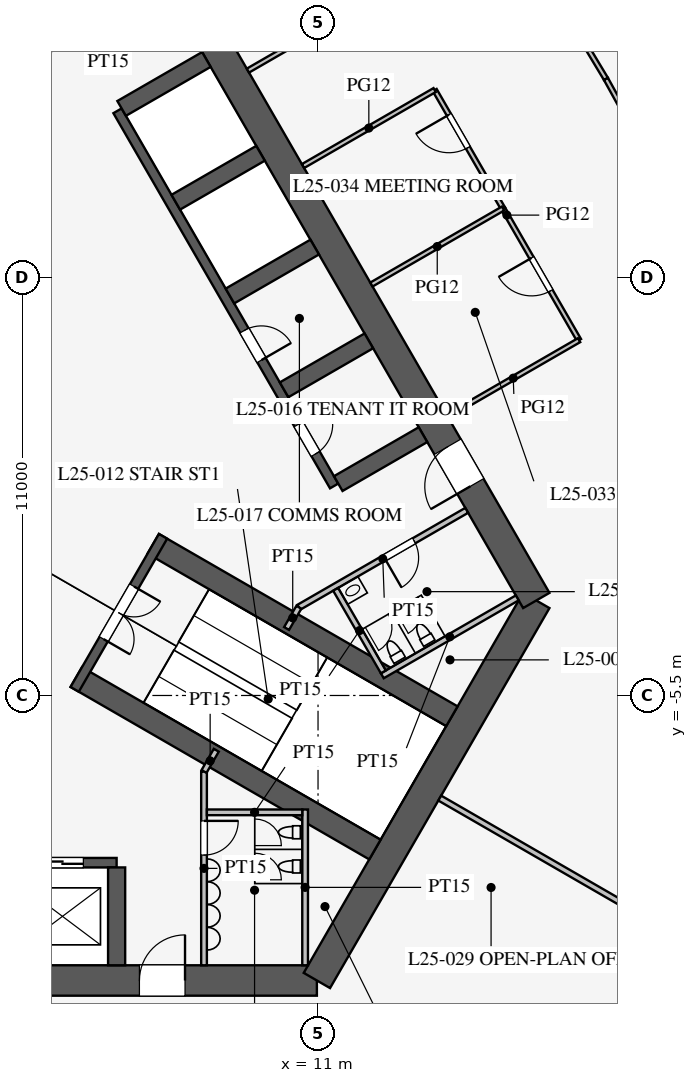
"""IFC4 building model, lengths in metres.
Left out: names, types, materials, properties, quantities, classifications, styles, units other than length and angle.
Written with IfcOpenShell. Run it as: python <this file> out.ifc"""

import sys

from ifc_helpers import new_model, si_unit, direction, frame, frame_2d, origin, place, context, subcontext, project, spatial, rectangle, extrude, element, fill, save


model = new_model("IFC4")
c1 = context("Model", 3, precision=1e-05, world=origin(), true_north=direction((0.0, 1.0)))
c2 = subcontext(c1, "Body", "Model", "MODEL_VIEW")
j1 = project(units=[si_unit("LENGTHUNIT", "METRE"), si_unit("PLANEANGLEUNIT", "RADIAN")], contexts=[c1])
p1 = place(None, origin())
s1 = spatial("IfcSite", under=j1, at=p1, CompositionType="ELEMENT")
p2 = place(p1, origin())
s2 = spatial("IfcBuilding", under=s1, at=p2, CompositionType="ELEMENT")
p3 = place(p2, frame((0.0, 0.0, 111.5)))
s3 = spatial("IfcBuildingStorey", under=s2, at=p3, CompositionType="ELEMENT", Elevation=111.5)
p4 = place(p3, frame((-10.97, -13.0, 0.0), z_axis=(0.0, 0.0, 1.0), x_axis=(1.0, 0.0, 0.0)))
e1 = element("IfcWall", 1, at=p4, inside=s3, PredefinedType="SHEAR", context=c2, shape_type="SweptSolid", body=[
    extrude(rectangle(XDim=21.939, YDim=0.8, at=frame_2d((10.97, 0.0))), origin(), (0.0, 0.0, 1.0), 4.2),
])
p5 = place(p4, frame((17.27, 0.0, 0.0)))
e2 = element("IfcOpeningElement", 2, at=p5, cuts=e1, PredefinedType="OPENING", context=c2, shape_type="SweptSolid", body=[
    extrude(rectangle(XDim=1.2, YDim=2.1, at=frame_2d((0.6, 1.05))), frame((0.0, 0.41, 0.0), z_axis=(0.0, -1.0, 0.0), x_axis=(1.0, 0.0, 0.0)), (0.0, 0.0, 1.0), 0.82),
])
p6 = place(p4, frame((3.47, 0.0, 0.0)))
e3 = element("IfcOpeningElement", 3, at=p6, cuts=e1, PredefinedType="OPENING", context=c2, shape_type="SweptSolid", body=[
    extrude(rectangle(XDim=1.2, YDim=2.1, at=frame_2d((0.6, 1.05))), frame((0.0, 0.41, 0.0), z_axis=(0.0, -1.0, 0.0), x_axis=(1.0, 0.0, 0.0)), (0.0, 0.0, 1.0), 0.82),
])
p7 = place(p3, frame((10.97, -13.0, 0.0), z_axis=(0.0, 0.0, 1.0), x_axis=(0.499995765644, 0.866027848477, 0.0)))
e4 = element("IfcWall", 4, at=p7, inside=s3, PredefinedType="SHEAR", context=c2, shape_type="SweptSolid", body=[
    extrude(rectangle(XDim=11.547, YDim=0.8, at=frame_2d((5.773, 0.0))), origin(), (0.0, 0.0, 1.0), 4.2),
])
p8 = place(p3, frame((16.743, -3.0, 0.0), z_axis=(0.0, 0.0, 1.0), x_axis=(-0.500002442456, 0.866023993627, 0.0)))
e5 = element("IfcWall", 5, at=p8, inside=s3, PredefinedType="SHEAR", context=c2, shape_type="SweptSolid", body=[
    extrude(rectangle(XDim=21.939, YDim=0.8, at=frame_2d((10.97, 0.0))), origin(), (0.0, 0.0, 1.0), 4.2),
])
p9 = place(p8, frame((17.27, 0.0, 0.0)))
e6 = element("IfcOpeningElement", 6, at=p9, cuts=e5, PredefinedType="OPENING", context=c2, shape_type="SweptSolid", body=[
    extrude(rectangle(XDim=1.2, YDim=2.1, at=frame_2d((0.6, 1.05))), frame((0.0, 0.41, 0.0), z_axis=(0.0, -1.0, 0.0), x_axis=(1.0, 0.0, 0.0)), (0.0, 0.0, 1.0), 0.82),
])
p10 = place(p8, frame((3.47, 0.0, 0.0)))
e7 = element("IfcOpeningElement", 7, at=p10, cuts=e5, PredefinedType="OPENING", context=c2, shape_type="SweptSolid", body=[
    extrude(rectangle(XDim=1.2, YDim=2.1, at=frame_2d((0.6, 1.05))), frame((0.0, 0.41, 0.0), z_axis=(0.0, -1.0, 0.0), x_axis=(1.0, 0.0, 0.0)), (0.0, 0.0, 1.0), 0.82),
])
p11 = place(p3, frame((-5.7, -9.9, 0.0), z_axis=(0.0, 0.0, 1.0), x_axis=(1.0, 0.0, 0.0)))
e8 = element("IfcWall", 8, at=p11, inside=s3, PredefinedType="SHEAR", context=c2, shape_type="SweptSolid", body=[
    extrude(rectangle(XDim=11.4, YDim=0.25, at=frame_2d((5.7, 0.0))), origin(), (0.0, 0.0, 1.0), 4.2),
])
p12 = place(p11, frame((0.875, 0.0, 0.0)))
e9 = element("IfcOpeningElement", 9, at=p12, cuts=e8, PredefinedType="OPENING", context=c2, shape_type="SweptSolid", body=[
    extrude(rectangle(XDim=1.1, YDim=2.2, at=frame_2d((0.55, 1.1))), frame((0.0, 0.135, 0.0), z_axis=(0.0, -1.0, 0.0), x_axis=(1.0, 0.0, 0.0)), (0.0, 0.0, 1.0), 0.27),
])
p13 = place(p11, frame((3.725, 0.0, 0.0)))
e10 = element("IfcOpeningElement", 10, at=p13, cuts=e8, PredefinedType="OPENING", context=c2, shape_type="SweptSolid", body=[
    extrude(rectangle(XDim=1.1, YDim=2.2, at=frame_2d((0.55, 1.1))), frame((0.0, 0.135, 0.0), z_axis=(0.0, -1.0, 0.0), x_axis=(1.0, 0.0, 0.0)), (0.0, 0.0, 1.0), 0.27),
])
p14 = place(p11, frame((6.575, 0.0, 0.0)))
e11 = element("IfcOpeningElement", 11, at=p14, cuts=e8, PredefinedType="OPENING", context=c2, shape_type="SweptSolid", body=[
    extrude(rectangle(XDim=1.1, YDim=2.2, at=frame_2d((0.55, 1.1))), frame((0.0, 0.135, 0.0), z_axis=(0.0, -1.0, 0.0), x_axis=(1.0, 0.0, 0.0)), (0.0, 0.0, 1.0), 0.27),
])
p15 = place(p11, frame((9.425, 0.0, 0.0)))
e12 = element("IfcOpeningElement", 12, at=p15, cuts=e8, PredefinedType="OPENING", context=c2, shape_type="SweptSolid", body=[
    extrude(rectangle(XDim=1.1, YDim=2.2, at=frame_2d((0.55, 1.1))), frame((0.0, 0.135, 0.0), z_axis=(0.0, -1.0, 0.0), x_axis=(1.0, 0.0, 0.0)), (0.0, 0.0, 1.0), 0.27),
])
p16 = place(p3, frame((5.7, -10.025, 0.0), z_axis=(0.0, 0.0, 1.0), x_axis=(0.0, -1.0, 0.0)))
e13 = element("IfcWall", 13, at=p16, inside=s3, PredefinedType="SHEAR", context=c2, shape_type="SweptSolid", body=[
    extrude(rectangle(XDim=2.575, YDim=0.45, at=frame_2d((1.288, 0.0))), origin(), (0.0, 0.0, 1.0), 4.2),
])
p17 = place(p3, frame((11.424, 0.014, 0.0), z_axis=(0.0, 0.0, 1.0), x_axis=(-0.500001763848, 0.866024385424, 0.0)))
e14 = element("IfcWall", 14, at=p17, inside=s3, PredefinedType="SHEAR", context=c2, shape_type="SweptSolid", body=[
    extrude(rectangle(XDim=11.4, YDim=0.25, at=frame_2d((5.7, 0.0))), origin(), (0.0, 0.0, 1.0), 4.2),
])
p18 = place(p17, frame((0.975, 0.0, 0.0)))
e15 = element("IfcOpeningElement", 15, at=p18, cuts=e14, PredefinedType="OPENING", context=c2, shape_type="SweptSolid", body=[
    extrude(rectangle(XDim=0.9, YDim=2.1, at=frame_2d((0.45, 1.05))), frame((0.0, 0.135, 0.0), z_axis=(0.0, -1.0, 0.0), x_axis=(1.0, 0.0, 0.0)), (0.0, 0.0, 1.0), 0.27),
])
p19 = place(p17, frame((3.825, 0.0, 0.0)))
e16 = element("IfcOpeningElement", 16, at=p19, cuts=e14, PredefinedType="OPENING", context=c2, shape_type="SweptSolid", body=[
    extrude(rectangle(XDim=0.9, YDim=2.1, at=frame_2d((0.45, 1.05))), frame((0.0, 0.135, 0.0), z_axis=(0.0, -1.0, 0.0), x_axis=(1.0, 0.0, 0.0)), (0.0, 0.0, 1.0), 0.27),
])
for number, where, z_axis, x_axis in (
    (17, (11.532, 0.076, 0.0), (0.0, 0.0, 1.0), (0.866, 0.5, 0.0)),
    (18, (10.107, 2.544, 0.0), (0.0, 0.0, 1.0), (0.866, 0.5, 0.0)),
    (19, (8.682, 5.012, 0.0), (0.0, 0.0, 1.0), (0.866, 0.5, 0.0)),
    (20, (7.257, 7.481, 0.0), (0.0, 0.0, 1.0), (0.866, 0.5, 0.0)),
):
    element("IfcWall", number, at=place(p3, frame(where, z_axis=z_axis, x_axis=x_axis)), inside=s3, PredefinedType="SHEAR", context=c2, shape_type="SweptSolid", body=[
        extrude(rectangle(XDim=2.575, YDim=0.45, at=frame_2d((1.288, 0.0))), origin(), (0.0, 0.0, 1.0), 4.2),
    ])
p20 = place(p3, frame((5.832, 9.949, 0.0), z_axis=(0.0, 0.0, 1.0), x_axis=(0.866029291668, 0.499993265928, 0.0)))
e21 = element("IfcWall", 21, at=p20, inside=s3, PredefinedType="SHEAR", context=c2, shape_type="SweptSolid", body=[
    extrude(rectangle(XDim=2.575, YDim=0.45, at=frame_2d((1.288, 0.0))), origin(), (0.0, 0.0, 1.0), 4.2),
])
for number, where, z_axis, x_axis in (
    (22, (4.638, -5.016, 0.0), (0.0, 0.0, 1.0), (0.866, -0.5, 0.0)),
    (23, (6.663, -1.509, 0.0), (0.0, 0.0, 1.0), (0.866, -0.5, 0.0)),
):
    element("IfcWall", number, at=place(p3, frame(where, z_axis=z_axis, x_axis=x_axis)), inside=s3, PredefinedType="SHEAR", context=c2, shape_type="SweptSolid", body=[
        extrude(rectangle(XDim=9.075, YDim=0.6, at=frame_2d((4.538, 0.0))), origin(), (0.0, 0.0, 1.0), 4.2),
    ])
p21 = place(p3, frame((4.597, -5.339, 0.0), z_axis=(0.0, 0.0, 1.0), x_axis=(0.499984536904, 0.866034331223, 0.0)))
e24 = element("IfcWall", 24, at=p21, inside=s3, PredefinedType="SHEAR", context=c2, shape_type="SweptSolid", body=[
    extrude(rectangle(XDim=4.65, YDim=0.25, at=frame_2d((2.325, 0.0))), origin(), (0.0, 0.0, 1.0), 4.2),
])
p22 = place(p21, frame((1.525, 0.0, 0.0)))
e25 = element("IfcOpeningElement", 25, at=p22, cuts=e24, PredefinedType="OPENING", context=c2, shape_type="SweptSolid", body=[
    extrude(rectangle(XDim=1.6, YDim=2.1, at=frame_2d((0.8, 1.05))), frame((0.0, 0.135, 0.0), z_axis=(0.0, -1.0, 0.0), x_axis=(1.0, 0.0, 0.0)), (0.0, 0.0, 1.0), 0.27),
])
p23 = place(p3, frame((8.0, -7.5, 0.0), z_axis=(0.0, 0.0, 1.0), x_axis=(0.0, -1.0, 0.0)))
e26 = element("IfcWall", 26, at=p23, inside=s3, PredefinedType="PARTITIONING", context=c2, shape_type="SweptSolid", body=[
    extrude(rectangle(XDim=5.1, YDim=0.15, at=frame_2d((2.55, 0.0))), origin(), (0.0, 0.0, 1.0), 4.0),
])
p24 = place(p23, frame((1.3, 0.0, 0.0)))
e27 = element("IfcOpeningElement", 27, at=p24, cuts=e26, PredefinedType="OPENING", context=c2, shape_type="SweptSolid", body=[
    extrude(rectangle(XDim=0.9, YDim=2.1, at=frame_2d((0.45, 1.05))), frame((0.0, 0.085, 0.0), z_axis=(0.0, -1.0, 0.0), x_axis=(1.0, 0.0, 0.0)), (0.0, 0.0, 1.0), 0.17),
])
p25 = place(p3, frame((2.495, 10.678, 0.0), z_axis=(0.0, 0.0, 1.0), x_axis=(0.86602216432, 0.500005610874, 0.0)))
e28 = element("IfcWall", 28, at=p25, inside=s3, PredefinedType="PARTITIONING", context=c2, shape_type="SweptSolid", body=[
    extrude(rectangle(XDim=5.1, YDim=0.15, at=frame_2d((2.55, 0.0))), origin(), (0.0, 0.0, 1.0), 4.0),
])
p26 = place(p25, frame((2.6, 0.0, 0.0)))
e29 = element("IfcOpeningElement", 29, at=p26, cuts=e28, PredefinedType="OPENING", context=c2, shape_type="SweptSolid", body=[
    extrude(rectangle(XDim=0.9, YDim=2.1, at=frame_2d((0.45, 1.05))), frame((0.0, 0.085, 0.0), z_axis=(0.0, -1.0, 0.0), x_axis=(1.0, 0.0, 0.0)), (0.0, 0.0, 1.0), 0.17),
])
p27 = place(p3, frame((10.495, -3.178, 0.0), z_axis=(0.0, 0.0, 1.0), x_axis=(0.86602216432, 0.500005610874, 0.0)))
e30 = element("IfcWall", 30, at=p27, inside=s3, PredefinedType="PARTITIONING", context=c2, shape_type="SweptSolid", body=[
    extrude(rectangle(XDim=5.1, YDim=0.15, at=frame_2d((2.55, 0.0))), origin(), (0.0, 0.0, 1.0), 4.0),
])
p28 = place(p27, frame((2.6, 0.0, 0.0)))
e31 = element("IfcOpeningElement", 31, at=p28, cuts=e30, PredefinedType="OPENING", context=c2, shape_type="SweptSolid", body=[
    extrude(rectangle(XDim=0.9, YDim=2.1, at=frame_2d((0.45, 1.05))), frame((0.0, 0.085, 0.0), z_axis=(0.0, -1.0, 0.0), x_axis=(1.0, 0.0, 0.0)), (0.0, 0.0, 1.0), 0.17),
])
for number, where, z_axis, x_axis in (
    (32, (8.0, -7.5, 0.0), (0.0, 0.0, 1.0), (0.5, 0.866, 0.0)),
    (33, (10.495, -3.178, 0.0), (0.0, 0.0, 1.0), (-0.5, -0.866, 0.0)),
):
    element("IfcWall", number, at=place(p3, frame(where, z_axis=z_axis, x_axis=x_axis)), inside=s3, PredefinedType="PARTITIONING", context=c2, shape_type="SweptSolid", body=[
        extrude(rectangle(XDim=0.645, YDim=0.15, at=frame_2d((0.323, 0.0))), origin(), (0.0, 0.0, 1.0), 4.0),
    ])
p29 = place(p3, frame((10.66, -8.5, 0.0), z_axis=(0.0, 0.0, 1.0), x_axis=(0.0, -1.0, 0.0)))
e34 = element("IfcWall", 34, at=p29, inside=s3, PredefinedType="PARTITIONING", context=c2, shape_type="SweptSolid", body=[
    extrude(rectangle(XDim=4.1, YDim=0.15, at=frame_2d((2.05, 0.0))), origin(), (0.0, 0.0, 1.0), 4.0),
])
p30 = place(p3, frame((8.075, -8.575, 0.0), z_axis=(0.0, 0.0, 1.0), x_axis=(1.0, 0.0, 0.0)))
e35 = element("IfcWall", 35, at=p30, inside=s3, PredefinedType="PARTITIONING", context=c2, shape_type="SweptSolid", body=[
    extrude(rectangle(XDim=2.51, YDim=0.15, at=frame_2d((1.255, 0.0))), origin(), (0.0, 0.0, 1.0), 4.0),
])
p31 = place(p3, frame((12.691, -4.982, 0.0), z_axis=(0.0, 0.0, 1.0), x_axis=(0.8660249478, 0.500000789788, 0.0)))
e36 = element("IfcWall", 36, at=p31, inside=s3, PredefinedType="PARTITIONING", context=c2, shape_type="SweptSolid", body=[
    extrude(rectangle(XDim=4.1, YDim=0.15, at=frame_2d((2.05, 0.0))), origin(), (0.0, 0.0, 1.0), 4.0),
])
p32 = place(p3, frame((11.464, -2.706, 0.0), z_axis=(0.0, 0.0, 1.0), x_axis=(0.50001992892, -0.866013897511, 0.0)))
e37 = element("IfcWall", 37, at=p32, inside=s3, PredefinedType="PARTITIONING", context=c2, shape_type="SweptSolid", body=[
    extrude(rectangle(XDim=2.51, YDim=0.15, at=frame_2d((1.255, 0.0))), origin(), (0.0, 0.0, 1.0), 4.0),
])
p33 = place(p3, frame((14.203, -8.2, 0.0), z_axis=(0.0, 0.0, 1.0), x_axis=(0.866024668836, -0.500001272966, 0.0)))
e38 = element("IfcWall", 38, at=p33, inside=s3, PredefinedType="PARTITIONING", context=c2, shape_type="SweptSolid", body=[
    extrude(rectangle(XDim=16.65, YDim=0.15, at=frame_2d((8.325, 0.0))), origin(), (0.0, 0.0, 1.0), 2.3),
])
p34 = place(p3, frame((15.869, 7.314, 0.0), z_axis=(0.0, 0.0, 1.0), x_axis=(-0.500012057535, 0.866018442252, 0.0)))
e39 = element("IfcWall", 39, at=p34, inside=s3, PredefinedType="PARTITIONING", context=c2, shape_type="SweptSolid", body=[
    extrude(rectangle(XDim=3.6, YDim=0.12, at=frame_2d((1.8, 0.0))), origin(), (0.0, 0.0, 1.0), 2.9),
])
p35 = place(p34, frame((1.85, 0.0, 0.15)))
e40 = element("IfcOpeningElement", 40, at=p35, cuts=e39, PredefinedType="OPENING", context=c2, shape_type="SweptSolid", body=[
    extrude(rectangle(XDim=1.0, YDim=2.1, at=frame_2d((0.5, 1.05))), frame((0.0, 0.07, 0.0), z_axis=(0.0, -1.0, 0.0), x_axis=(1.0, 0.0, 0.0)), (0.0, 0.0, 1.0), 0.14),
])
p36 = place(p3, frame((17.869, 3.85, 0.0), z_axis=(0.0, 0.0, 1.0), x_axis=(-0.49999894854, 0.866026010844, 0.0)))
e41 = element("IfcWall", 41, at=p36, inside=s3, PredefinedType="PARTITIONING", context=c2, shape_type="SweptSolid", body=[
    extrude(rectangle(XDim=4.0, YDim=0.12, at=frame_2d((2.0, 0.0))), origin(), (0.0, 0.0, 1.0), 2.9),
])
p37 = place(p36, frame((1.5, 0.0, 0.15)))
e42 = element("IfcOpeningElement", 42, at=p37, cuts=e41, PredefinedType="OPENING", context=c2, shape_type="SweptSolid", body=[
    extrude(rectangle(XDim=1.0, YDim=2.1, at=frame_2d((0.5, 1.05))), frame((0.0, 0.07, 0.0), z_axis=(0.0, -1.0, 0.0), x_axis=(1.0, 0.0, 0.0)), (0.0, 0.0, 1.0), 0.14),
])
p38 = place(p3, frame((10.605, 8.432, 0.0), z_axis=(0.0, 0.0, 1.0), x_axis=(0.866026010844, 0.49999894854, 0.0)))
e43 = element("IfcWall", 43, at=p38, inside=s3, PredefinedType="PARTITIONING", context=c2, shape_type="SweptSolid", body=[
    extrude(rectangle(XDim=4.0, YDim=0.12, at=frame_2d((2.0, 0.0))), origin(), (0.0, 0.0, 1.0), 2.9),
])
p39 = place(p3, frame((9.155, 10.944, 0.0), z_axis=(0.0, 0.0, 1.0), x_axis=(0.866017533419, 0.500013631625, 0.0)))
e44 = element("IfcWall", 44, at=p39, inside=s3, PredefinedType="PARTITIONING", context=c2, shape_type="SweptSolid", body=[
    extrude(rectangle(XDim=4.5, YDim=0.12, at=frame_2d((2.25, 0.0))), origin(), (0.0, 0.0, 1.0), 2.9),
])
for number, where, z_axis, x_axis in (
    (45, (12.405, 5.314, 0.0), (0.0, 0.0, 1.0), (0.866, 0.5, 0.0)),
    (46, (14.405, 1.85, 0.0), (0.0, 0.0, 1.0), (0.866, 0.5, 0.0)),
):
    element("IfcWall", number, at=place(p3, frame(where, z_axis=z_axis, x_axis=x_axis)), inside=s3, PredefinedType="PARTITIONING", context=c2, shape_type="SweptSolid", body=[
        extrude(rectangle(XDim=4.0, YDim=0.12, at=frame_2d((2.0, 0.0))), origin(), (0.0, 0.0, 1.0), 2.9),
    ])
p40 = place(p3, frame((18.576, 10.725, 0.0), z_axis=(0.0, 0.0, 1.0), x_axis=(-0.515548366618, 0.856860479703, 0.0)))
e47 = element("IfcWall", 47, at=p40, inside=s3, PredefinedType="PARTITIONING", context=c2, shape_type="SweptSolid", body=[
    extrude(rectangle(XDim=4.501, YDim=0.12, at=frame_2d((2.25, 0.0))), origin(), (0.0, 0.0, 1.0), 2.9),
])
p41 = place(p40, frame((1.75, 0.0, 0.15)))
e48 = element("IfcOpeningElement", 48, at=p41, cuts=e47, PredefinedType="OPENING", context=c2, shape_type="SweptSolid", body=[
    extrude(rectangle(XDim=1.0, YDim=2.1, at=frame_2d((0.5, 1.05))), frame((0.0, 0.07, 0.0), z_axis=(0.0, -1.0, 0.0), x_axis=(1.0, 0.0, 0.0)), (0.0, 0.0, 1.0), 0.14),
])
p42 = place(p3, frame((20.756, 6.787, 0.0), z_axis=(0.0, 0.0, 1.0), x_axis=(-0.484292898211, 0.874905931368, 0.0)))
e49 = element("IfcWall", 49, at=p42, inside=s3, PredefinedType="PARTITIONING", context=c2, shape_type="SweptSolid", body=[
    extrude(rectangle(XDim=4.501, YDim=0.12, at=frame_2d((2.25, 0.0))), origin(), (0.0, 0.0, 1.0), 2.9),
])
p43 = place(p24, origin())
e50 = element("IfcDoor", 50, at=p43, inside=s3, OperationType="SINGLE_SWING_LEFT", PredefinedType="DOOR", context=c2, shape_type="SweptSolid", body=[
    extrude(rectangle(XDim=0.9, YDim=2.1, at=frame_2d((0.45, 1.05))), frame((0.0, 0.025, 0.0), z_axis=(0.0, -1.0, 0.0), x_axis=(1.0, 0.0, 0.0)), (0.0, 0.0, 1.0), 0.05),
])
fill(e27, e50)
p44 = place(p28, frame((0.9, 0.0, 0.0), z_axis=(0.0, 0.0, 1.0), x_axis=(-1.0, 0.0, 0.0)))
e51 = element("IfcDoor", 51, at=p44, inside=s3, OperationType="SINGLE_SWING_RIGHT", PredefinedType="DOOR", context=c2, shape_type="SweptSolid", body=[
    extrude(rectangle(XDim=0.9, YDim=2.1, at=frame_2d((0.45, 1.05))), frame((0.0, 0.025, 0.0), z_axis=(0.0, -1.0, 0.0), x_axis=(1.0, 0.0, 0.0)), (0.0, 0.0, 1.0), 0.05),
])
fill(e31, e51)
p45 = place(p22, frame((1.6, 0.0, 0.0), z_axis=(0.0, 0.0, 1.0), x_axis=(-1.0, 0.0, 0.0)))
e52 = element("IfcDoor", 52, at=p45, inside=s3, OperationType="DOUBLE_DOOR_SINGLE_SWING", PredefinedType="DOOR", context=c2, shape_type="SweptSolid", body=[
    extrude(rectangle(XDim=1.6, YDim=2.1, at=frame_2d((0.8, 1.05))), frame((0.0, 0.025, 0.0), z_axis=(0.0, -1.0, 0.0), x_axis=(1.0, 0.0, 0.0)), (0.0, 0.0, 1.0), 0.05),
])
fill(e25, e52)
p46 = place(p5, origin())
e53 = element("IfcDoor", 53, at=p46, inside=s3, OperationType="SINGLE_SWING_RIGHT", PredefinedType="DOOR", context=c2, shape_type="SweptSolid", body=[
    extrude(rectangle(XDim=1.2, YDim=2.1, at=frame_2d((0.6, 1.05))), frame((0.0, 0.025, 0.0), z_axis=(0.0, -1.0, 0.0), x_axis=(1.0, 0.0, 0.0)), (0.0, 0.0, 1.0), 0.05),
])
fill(e2, e53)
p47 = place(p10, origin())
e54 = element("IfcDoor", 54, at=p47, inside=s3, OperationType="SINGLE_SWING_LEFT", PredefinedType="DOOR", context=c2, shape_type="SweptSolid", body=[
    extrude(rectangle(XDim=1.2, YDim=2.1, at=frame_2d((0.6, 1.05))), frame((0.0, 0.025, 0.0), z_axis=(0.0, -1.0, 0.0), x_axis=(1.0, 0.0, 0.0)), (0.0, 0.0, 1.0), 0.05),
])
fill(e7, e54)
p48 = place(p18, frame((0.9, 0.0, 0.0), z_axis=(0.0, 0.0, 1.0), x_axis=(-1.0, 0.0, 0.0)))
e55 = element("IfcDoor", 55, at=p48, inside=s3, OperationType="SINGLE_SWING_LEFT", PredefinedType="DOOR", context=c2, shape_type="SweptSolid", body=[
    extrude(rectangle(XDim=0.9, YDim=2.1, at=frame_2d((0.45, 1.05))), frame((0.0, 0.025, 0.0), z_axis=(0.0, -1.0, 0.0), x_axis=(1.0, 0.0, 0.0)), (0.0, 0.0, 1.0), 0.05),
])
fill(e15, e55)
p49 = place(p19, frame((0.9, 0.0, 0.0), z_axis=(0.0, 0.0, 1.0), x_axis=(-1.0, 0.0, 0.0)))
e56 = element("IfcDoor", 56, at=p49, inside=s3, OperationType="SINGLE_SWING_RIGHT", PredefinedType="DOOR", context=c2, shape_type="SweptSolid", body=[
    extrude(rectangle(XDim=0.9, YDim=2.1, at=frame_2d((0.45, 1.05))), frame((0.0, 0.025, 0.0), z_axis=(0.0, -1.0, 0.0), x_axis=(1.0, 0.0, 0.0)), (0.0, 0.0, 1.0), 0.05),
])
fill(e16, e56)
p50 = place(p37, origin())
e57 = element("IfcDoor", 57, at=p50, inside=s3, OperationType="SINGLE_SWING_RIGHT", PredefinedType="DOOR", context=c2, shape_type="SweptSolid", body=[
    extrude(rectangle(XDim=1.0, YDim=2.1, at=frame_2d((0.5, 1.05))), frame((0.0, 0.025, 0.0), z_axis=(0.0, -1.0, 0.0), x_axis=(1.0, 0.0, 0.0)), (0.0, 0.0, 1.0), 0.05),
])
fill(e42, e57)
p51 = place(p35, origin())
e58 = element("IfcDoor", 58, at=p51, inside=s3, OperationType="SINGLE_SWING_RIGHT", PredefinedType="DOOR", context=c2, shape_type="SweptSolid", body=[
    extrude(rectangle(XDim=1.0, YDim=2.1, at=frame_2d((0.5, 1.05))), frame((0.0, 0.025, 0.0), z_axis=(0.0, -1.0, 0.0), x_axis=(1.0, 0.0, 0.0)), (0.0, 0.0, 1.0), 0.05),
])
fill(e40, e58)
p52 = place(p15, origin())
e59 = element("IfcDoor", 59, at=p52, inside=s3, OperationType="DOUBLE_DOOR_SLIDING", PredefinedType="DOOR", context=c2, shape_type="SweptSolid", body=[
    extrude(rectangle(XDim=1.1, YDim=2.2, at=frame_2d((0.55, 1.1))), frame((0.0, 0.025, 0.0), z_axis=(0.0, -1.0, 0.0), x_axis=(1.0, 0.0, 0.0)), (0.0, 0.0, 1.0), 0.05),
])
fill(e12, e59)
save(model, sys.argv[1])
